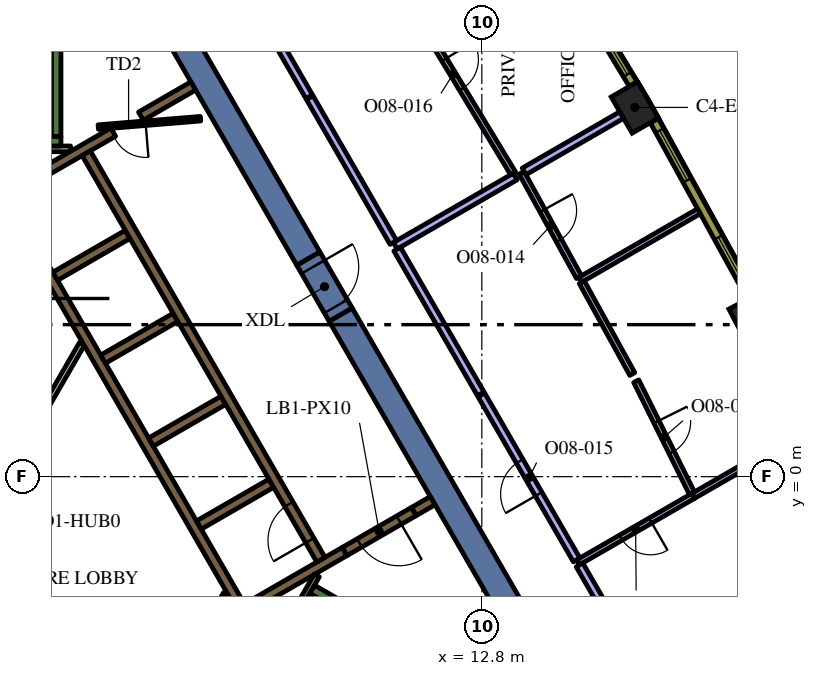
"""IFC4 building model, lengths in metres.
Left out: names, types, materials, properties, quantities, classifications, styles, units other than length and angle.
Written with IfcOpenShell. Run it as: python <this file> out.ifc"""

import sys

from ifc_helpers import new_model, si_unit, direction, frame, frame_2d, origin, origin_2d, place, context, subcontext, project, spatial, rectangle, extrude, element, fill, save


model = new_model("IFC4")
c1 = context("Model", 3, precision=1e-05, world=origin(), true_north=direction((0.0, 1.0)))
c2 = subcontext(c1, "Body", "Model", "MODEL_VIEW")
j1 = project(units=[si_unit("LENGTHUNIT", "METRE"), si_unit("PLANEANGLEUNIT", "RADIAN")], contexts=[c1])
p1 = place(None, origin())
s1 = spatial("IfcSite", under=j1, at=p1, CompositionType="ELEMENT")
p2 = place(p1, origin())
s2 = spatial("IfcBuilding", under=s1, at=p2, CompositionType="ELEMENT")
p3 = place(p2, frame((0.0, 0.0, 235.2)))
s3 = spatial("IfcBuildingStorey", under=s2, at=p3, CompositionType="ELEMENT", Elevation=235.2)
for number, where, z_axis, x_axis in (
    (1, (19.912, 4.108, 0.0), (0.0, 0.0, 1.0), (-0.464, 0.886, 0.0)),
    (2, (16.827, 9.715, 0.0), (0.0, 0.0, 1.0), (-0.5, 0.866, 0.0)),
):
    element("IfcColumn", number, at=place(p3, frame(where, z_axis=z_axis, x_axis=x_axis)), inside=s3, PredefinedType="COLUMN", context=c2, shape_type="SweptSolid", body=[
        extrude(rectangle(XDim=1.1, YDim=0.8, at=origin_2d()), origin(), (0.0, 0.0, 1.0), 4.2),
    ])
for number, where, z_axis, x_axis in (
    (3, (9.085, 4.264, 0.0), (0.0, 0.0, 1.0), (0.5, -0.866, 0.0)),
    (4, (8.235, 5.736, 0.0), (0.0, 0.0, 1.0), (-0.5, 0.866, 0.0)),
):
    element("IfcWall", number, at=place(p3, frame(where, z_axis=z_axis, x_axis=x_axis)), inside=s3, PredefinedType="SOLIDWALL", context=c2, shape_type="SweptSolid", body=[
        extrude(rectangle(XDim=12.472, YDim=0.7, at=frame_2d((6.236, 0.0))), origin(), (0.0, 0.0, 1.0), 4.2),
    ])
p4 = place(p3, frame((8.334, -2.964, 0.0), z_axis=(0.0, 0.0, 1.0), x_axis=(0.866016039709, -0.500016218704, 0.0)))
e5 = element("IfcWall", 5, at=p4, inside=s3, PredefinedType="SOLIDWALL", context=c2, shape_type="SweptSolid", body=[
    extrude(rectangle(XDim=7.05, YDim=0.25, at=frame_2d((3.525, 0.0))), origin(), (0.0, 0.0, 1.0), 4.2),
])
p5 = place(p3, frame((8.168, -3.503, 0.0), z_axis=(0.0, 0.0, 1.0), x_axis=(0.49972245349, 0.866185586049, 0.0)))
e6 = element("IfcWall", 6, at=p5, inside=s3, PredefinedType="SOLIDWALL", context=c2, shape_type="SweptSolid", body=[
    extrude(rectangle(XDim=0.425, YDim=0.25, at=frame_2d((0.212, 0.0))), origin(), (0.0, 0.0, 1.0), 4.2),
])
p6 = place(p3, frame((1.6, 8.95, 0.0), z_axis=(0.0, 0.0, 1.0), x_axis=(0.0, 1.0, 0.0)))
e7 = element("IfcWall", 7, at=p6, inside=s3, PredefinedType="SOLIDWALL", context=c2, shape_type="SweptSolid", body=[
    extrude(rectangle(XDim=6.8, YDim=0.25, at=frame_2d((3.4, 0.0))), origin(), (0.0, 0.0, 1.0), 4.2),
])
p7 = place(p3, frame((1.05, 8.825, 0.0), z_axis=(0.0, 0.0, 1.0), x_axis=(1.0, 0.0, 0.0)))
e8 = element("IfcWall", 8, at=p7, inside=s3, PredefinedType="SOLIDWALL", context=c2, shape_type="SweptSolid", body=[
    extrude(rectangle(XDim=0.675, YDim=0.25, at=frame_2d((0.337, 0.0))), origin(), (0.0, 0.0, 1.0), 4.2),
])
p8 = place(p3, frame((11.507, -0.631, 0.0), z_axis=(0.0, 0.0, 1.0), x_axis=(-0.866093731455, -0.499881634324, 0.0)))
e9 = element("IfcWall", 9, at=p8, inside=s3, PredefinedType="SOLIDWALL", context=c2, shape_type="SweptSolid", body=[
    extrude(rectangle(XDim=0.575, YDim=0.25, at=frame_2d((0.288, 0.0))), origin(), (0.0, 0.0, 1.0), 4.2),
])
p9 = place(p3, frame((6.568, -3.627, 0.0), z_axis=(0.0, 0.0, 1.0), x_axis=(-0.499999455981, 0.866025717874, 0.0)))
e10 = element("IfcWall", 10, at=p9, inside=s3, PredefinedType="SOLIDWALL", context=c2, shape_type="SweptSolid", body=[
    extrude(rectangle(XDim=11.978, YDim=0.25, at=frame_2d((5.989, 0.0))), origin(), (0.0, 0.0, 1.0), 4.2),
])
p10 = place(p3, frame((3.1, 9.064, 0.0), z_axis=(0.0, 0.0, 1.0), x_axis=(-0.866030133475, -0.499991807846, 0.0)))
e11 = element("IfcWall", 11, at=p10, inside=s3, PredefinedType="SOLIDWALL", context=c2, shape_type="SweptSolid", body=[
    extrude(rectangle(XDim=3.217, YDim=0.25, at=frame_2d((1.608, 0.0))), origin(), (0.0, 0.0, 1.0), 4.2),
])
p11 = place(p3, frame((1.574, 5.274, 0.0), z_axis=(0.0, 0.0, 1.0), x_axis=(0.866028486751, 0.499994660107, 0.0)))
e12 = element("IfcWall", 12, at=p11, inside=s3, PredefinedType="SOLIDWALL", context=c2, shape_type="SweptSolid", body=[
    extrude(rectangle(XDim=2.2, YDim=0.25, at=frame_2d((1.1, 0.0))), origin(), (0.0, 0.0, 1.0), 4.2),
])
for number, where, z_axis, x_axis in (
    (13, (2.834, 3.091, 0.0), (0.0, 0.0, 1.0), (0.866, 0.5, 0.0)),
    (14, (4.094, 0.909, 0.0), (0.0, 0.0, 1.0), (0.866, 0.5, 0.0)),
    (15, (5.354, -1.274, 0.0), (0.0, 0.0, 1.0), (0.866, 0.5, 0.0)),
):
    element("IfcWall", number, at=place(p3, frame(where, z_axis=z_axis, x_axis=x_axis)), inside=s3, PredefinedType="SOLIDWALL", context=c2, shape_type="SweptSolid", body=[
        extrude(rectangle(XDim=2.2, YDim=0.25, at=frame_2d((1.1, 0.0))), origin(), (0.0, 0.0, 1.0), 4.2),
    ])
p12 = place(p3, frame((6.614, -3.456, 0.0), z_axis=(0.0, 0.0, 1.0), x_axis=(0.866032512851, 0.499987686533, 0.0)))
e16 = element("IfcWall", 16, at=p12, inside=s3, PredefinedType="SOLIDWALL", context=c2, shape_type="SweptSolid", body=[
    extrude(rectangle(XDim=2.975, YDim=0.25, at=frame_2d((1.487, 0.0))), origin(), (0.0, 0.0, 1.0), 4.2),
])
p13 = place(p3, frame((3.83, 9.486, 0.0), z_axis=(0.0, 0.0, 1.0), x_axis=(0.865986202621, 0.500067892261, 0.0)))
e17 = element("IfcWall", 17, at=p13, inside=s3, PredefinedType="SOLIDWALL", context=c2, shape_type="SweptSolid", body=[
    extrude(rectangle(XDim=1.591, YDim=0.25, at=frame_2d((0.795, 0.0))), origin(), (0.0, 0.0, 1.0), 4.2),
])
p14 = place(p3, frame((1.05, 8.625, 0.0), z_axis=(0.0, 0.0, 1.0), x_axis=(1.0, 0.0, 0.0)))
e18 = element("IfcWall", 18, at=p14, inside=s3, PredefinedType="PARTITIONING", context=c2, shape_type="SweptSolid", body=[
    extrude(rectangle(XDim=0.929, YDim=0.15, at=frame_2d((0.464, 0.0))), origin(), (0.0, 0.0, 1.0), 3.45),
])
p15 = place(p3, frame((8.459, -2.599, 0.0), z_axis=(0.0, 0.0, 1.0), x_axis=(-0.500041054325, -0.866001699761, 0.0)))
e19 = element("IfcWall", 19, at=p15, inside=s3, PredefinedType="PARTITIONING", context=c2, shape_type="SweptSolid", body=[
    extrude(rectangle(XDim=0.929, YDim=0.15, at=frame_2d((0.464, 0.0))), origin(), (0.0, 0.0, 1.0), 4.2),
])
p16 = place(p3, frame((5.705, -3.718, 0.0), z_axis=(0.0, 0.0, 1.0), x_axis=(0.499962090823, 0.866047289552, 0.0)))
e20 = element("IfcWall", 20, at=p16, inside=s3, PredefinedType="PARTITIONING", context=c2, shape_type="SweptSolid", body=[
    extrude(rectangle(XDim=0.735, YDim=0.15, at=frame_2d((0.367, 0.0))), origin(), (0.0, 0.0, 1.0), 3.45),
])
p17 = place(p3, frame((0.72, 0.797, 0.0), z_axis=(0.0, 0.0, 1.0), x_axis=(0.499984921984, 0.866034108906, 0.0)))
e21 = element("IfcWall", 21, at=p17, inside=s3, PredefinedType="PARTITIONING", context=c2, shape_type="SweptSolid", body=[
    extrude(rectangle(XDim=3.113, YDim=0.15, at=frame_2d((1.557, 0.0))), origin(), (0.0, 0.0, 1.0), 3.45),
])
p18 = place(p3, frame((8.565, -2.185, 0.0), z_axis=(0.0, 0.0, 1.0), x_axis=(-0.499997954832, 0.866026584559, 0.0)))
e22 = element("IfcWall", 22, at=p18, inside=s3, PredefinedType="SOLIDWALL", context=c2, shape_type="SweptSolid", body=[
    extrude(rectangle(XDim=12.35, YDim=0.25, at=frame_2d((6.175, 0.0))), origin(), (0.0, 0.0, 1.0), 4.2),
])
p19 = place(p18, frame((0.585, 0.0, 0.0)))
e23 = element("IfcOpeningElement", 23, at=p19, cuts=e22, PredefinedType="OPENING", context=c2, shape_type="SweptSolid", body=[
    extrude(rectangle(XDim=1.1, YDim=2.1, at=frame_2d((0.55, 1.05))), frame((0.0, 0.135, 0.0), z_axis=(0.0, -1.0, 0.0), x_axis=(1.0, 0.0, 0.0)), (0.0, 0.0, 1.0), 0.27),
])
p20 = place(p3, frame((5.398, 9.419, 0.0), z_axis=(0.0, 0.0, 1.0), x_axis=(-0.996653416376, -0.081743303248, 0.0)))
e24 = element("IfcWall", 24, at=p20, inside=s3, PredefinedType="PARTITIONING", context=c2, shape_type="SweptSolid", body=[
    extrude(rectangle(XDim=2.7, YDim=0.12, at=frame_2d((1.35, 0.0))), origin(), (0.0, 0.0, 1.0), 3.45),
])
p21 = place(p20, frame((1.45, 0.0, 0.0)))
e25 = element("IfcOpeningElement", 25, at=p21, cuts=e24, PredefinedType="OPENING", context=c2, shape_type="SweptSolid", body=[
    extrude(rectangle(XDim=0.9, YDim=2.1, at=frame_2d((0.45, 1.05))), frame((0.0, 0.07, 0.0), z_axis=(0.0, -1.0, 0.0), x_axis=(1.0, 0.0, 0.0)), (0.0, 0.0, 1.0), 0.14),
])
p22 = place(p3, frame((11.009, -0.919, 0.0), z_axis=(0.0, 0.0, 1.0), x_axis=(-0.866059744384, -0.49994051562, 0.0)))
e26 = element("IfcWall", 26, at=p22, inside=s3, PredefinedType="SOLIDWALL", context=c2, shape_type="SweptSolid", body=[
    extrude(rectangle(XDim=2.1, YDim=0.25, at=frame_2d((1.05, 0.0))), origin(), (0.0, 0.0, 1.0), 4.2),
])
p23 = place(p22, frame((0.45, 0.0, 0.0)))
e27 = element("IfcOpeningElement", 27, at=p23, cuts=e26, PredefinedType="OPENING", context=c2, shape_type="SweptSolid", body=[
    extrude(rectangle(XDim=1.2, YDim=2.1, at=frame_2d((0.6, 1.05))), frame((0.0, 0.135, 0.0), z_axis=(0.0, -1.0, 0.0), x_axis=(1.0, 0.0, 0.0)), (0.0, 0.0, 1.0), 0.27),
])
p24 = place(p3, frame((8.235, 5.736, 0.0), z_axis=(0.0, 0.0, 1.0), x_axis=(0.499954529098, -0.86605165483, 0.0)))
e28 = element("IfcWall", 28, at=p24, inside=s3, PredefinedType="SOLIDWALL", context=c2, shape_type="SweptSolid", body=[
    extrude(rectangle(XDim=1.7, YDim=0.7, at=frame_2d((0.85, 0.0))), origin(), (0.0, 0.0, 1.0), 4.2),
])
p25 = place(p24, frame((0.25, 0.0, 0.0)))
e29 = element("IfcOpeningElement", 29, at=p25, cuts=e28, PredefinedType="OPENING", context=c2, shape_type="SweptSolid", body=[
    extrude(rectangle(XDim=1.2, YDim=2.1, at=frame_2d((0.6, 1.05))), frame((0.0, 0.36, 0.0), z_axis=(0.0, -1.0, 0.0), x_axis=(1.0, 0.0, 0.0)), (0.0, 0.0, 1.0), 0.72),
])
p26 = place(p3, frame((18.36, -0.508, 0.0), z_axis=(0.0, 0.0, 1.0), x_axis=(0.866033589339, 0.499985821935, 0.0)))
e30 = element("IfcWall", 30, at=p26, inside=s3, PredefinedType="PARTITIONING", context=c2, shape_type="SweptSolid", body=[
    extrude(rectangle(XDim=3.611, YDim=0.15, at=frame_2d((1.805, 0.0))), origin(), (0.0, 0.0, 1.0), 3.45),
])
p27 = place(p3, frame((18.367, -0.504, 0.0), z_axis=(0.0, 0.0, 1.0), x_axis=(-0.866056812483, -0.499945594592, 0.0)))
e31 = element("IfcWall", 31, at=p27, inside=s3, PredefinedType="PARTITIONING", context=c2, shape_type="SweptSolid", body=[
    extrude(rectangle(XDim=3.504, YDim=0.15, at=frame_2d((1.752, 0.0))), origin(), (0.0, 0.0, 1.0), 3.45),
])
p28 = place(p27, frame((1.304, 0.0, 0.0)))
e32 = element("IfcOpeningElement", 32, at=p28, cuts=e31, PredefinedType="OPENING", context=c2, shape_type="SweptSolid", body=[
    extrude(rectangle(XDim=0.9, YDim=2.1, at=frame_2d((0.45, 1.05))), frame((0.0, 0.085, 0.0), z_axis=(0.0, -1.0, 0.0), x_axis=(1.0, 0.0, 0.0)), (0.0, 0.0, 1.0), 0.17),
])
p29 = place(p3, frame((17.696, -6.35, 0.0), z_axis=(0.0, 0.0, 1.0), x_axis=(-0.499976825411, 0.866038783226, 0.0)))
e33 = element("IfcWall", 33, at=p29, inside=s3, PredefinedType="PARTITIONING", context=c2, shape_type="SweptSolid", body=[
    extrude(rectangle(XDim=4.653, YDim=0.2, at=frame_2d((2.326, 0.0))), origin(), (0.0, 0.0, 1.0), 3.45),
])
p30 = place(p3, frame((15.394, 5.183, 0.0), z_axis=(0.0, 0.0, 1.0), x_axis=(0.866039935929, 0.499974828743, 0.0)))
e34 = element("IfcWall", 34, at=p30, inside=s3, PredefinedType="PARTITIONING", context=c2, shape_type="SweptSolid", body=[
    extrude(rectangle(XDim=3.601, YDim=0.15, at=frame_2d((1.8, 0.0))), origin(), (0.0, 0.0, 1.0), 3.45),
])
p31 = place(p3, frame((16.863, 2.513, 0.0), z_axis=(0.0, 0.0, 1.0), x_axis=(0.445197589821, -0.895432357031, 0.0)))
e35 = element("IfcWall", 35, at=p31, inside=s3, PredefinedType="PARTITIONING", context=c2, shape_type="SweptSolid", body=[
    extrude(rectangle(XDim=3.296, YDim=0.15, at=frame_2d((1.648, 0.0))), origin(), (0.0, 0.0, 1.0), 3.45),
])
p32 = place(p31, frame((1.196, 0.0, 0.0)))
e36 = element("IfcOpeningElement", 36, at=p32, cuts=e35, PredefinedType="OPENING", context=c2, shape_type="SweptSolid", body=[
    extrude(rectangle(XDim=0.9, YDim=2.1, at=frame_2d((0.45, 1.05))), frame((0.0, 0.085, 0.0), z_axis=(0.0, -1.0, 0.0), x_axis=(1.0, 0.0, 0.0)), (0.0, 0.0, 1.0), 0.17),
])
p33 = place(p3, frame((16.76, 2.7, 0.0), z_axis=(0.0, 0.0, 1.0), x_axis=(-0.481888167687, 0.876232728128, 0.0)))
e37 = element("IfcWall", 37, at=p33, inside=s3, PredefinedType="PARTITIONING", context=c2, shape_type="SweptSolid", body=[
    extrude(rectangle(XDim=2.758, YDim=0.15, at=frame_2d((1.379, 0.0))), origin(), (0.0, 0.0, 1.0), 3.45),
])
p34 = place(p3, frame((13.848, 7.995, 0.0), z_axis=(0.0, 0.0, 1.0), x_axis=(0.481894826099, -0.876229066272, 0.0)))
e38 = element("IfcWall", 38, at=p34, inside=s3, PredefinedType="PARTITIONING", context=c2, shape_type="SweptSolid", body=[
    extrude(rectangle(XDim=3.134, YDim=0.15, at=frame_2d((1.567, 0.0))), origin(), (0.0, 0.0, 1.0), 3.45),
])
p35 = place(p34, frame((1.134, 0.0, 0.0)))
e39 = element("IfcOpeningElement", 39, at=p35, cuts=e38, PredefinedType="OPENING", context=c2, shape_type="SweptSolid", body=[
    extrude(rectangle(XDim=0.9, YDim=2.1, at=frame_2d((0.45, 1.05))), frame((0.0, 0.085, 0.0), z_axis=(0.0, -1.0, 0.0), x_axis=(1.0, 0.0, 0.0)), (0.0, 0.0, 1.0), 0.17),
])
p36 = place(p3, frame((13.913, 8.032, 0.0), z_axis=(0.0, 0.0, 1.0), x_axis=(0.866015594979, 0.500016988964, 0.0)))
e40 = element("IfcWall", 40, at=p36, inside=s3, PredefinedType="PARTITIONING", context=c2, shape_type="SweptSolid", body=[
    extrude(rectangle(XDim=2.966, YDim=0.2, at=frame_2d((1.483, 0.0))), origin(), (0.0, 0.0, 1.0), 3.45),
])
p37 = place(p3, frame((10.522, 6.075, 0.0), z_axis=(0.0, 0.0, 1.0), x_axis=(0.866003708037, 0.500037576254, 0.0)))
e41 = element("IfcWall", 41, at=p37, inside=s3, PredefinedType="PARTITIONING", context=c2, shape_type="SweptSolid", body=[
    extrude(rectangle(XDim=3.644, YDim=0.2, at=frame_2d((1.822, 0.0))), origin(), (0.0, 0.0, 1.0), 3.45),
])
p38 = place(p3, frame((12.772, 2.178, 0.0), z_axis=(0.0, 0.0, 1.0), x_axis=(-0.50001224981, 0.866018331238, 0.0)))
e42 = element("IfcWall", 42, at=p38, inside=s3, PredefinedType="PARTITIONING", context=c2, shape_type="SweptSolid", body=[
    extrude(rectangle(XDim=4.4, YDim=0.2, at=frame_2d((2.2, 0.0))), origin(), (0.0, 0.0, 1.0), 3.45),
])
p39 = place(p3, frame((15.295, -2.191, 0.0), z_axis=(0.0, 0.0, 1.0), x_axis=(-0.500039923732, 0.86600235258, 0.0)))
e43 = element("IfcWall", 43, at=p39, inside=s3, PredefinedType="PARTITIONING", context=c2, shape_type="SweptSolid", body=[
    extrude(rectangle(XDim=5.015, YDim=0.2, at=frame_2d((2.507, 0.0))), origin(), (0.0, 0.0, 1.0), 3.45),
])
p40 = place(p39, frame((2.0, 0.0, 0.0)))
e44 = element("IfcOpeningElement", 44, at=p40, cuts=e43, PredefinedType="OPENING", context=c2, shape_type="SweptSolid", body=[
    extrude(rectangle(XDim=1.0, YDim=2.1, at=frame_2d((0.5, 1.05))), frame((0.0, 0.11, 0.0), z_axis=(0.0, -1.0, 0.0), x_axis=(1.0, 0.0, 0.0)), (0.0, 0.0, 1.0), 0.22),
])
p41 = place(p3, frame((10.439, 13.24, 0.0), z_axis=(0.0, 0.0, 1.0), x_axis=(0.517837859082, -0.855478785068, 0.0)))
e45 = element("IfcWall", 45, at=p41, inside=s3, PredefinedType="PARTITIONING", context=c2, shape_type="SweptSolid", body=[
    extrude(rectangle(XDim=6.148, YDim=0.15, at=frame_2d((3.074, 0.0))), origin(), (0.0, 0.0, 1.0), 3.45),
])
p42 = place(p41, frame((2.648, 0.0, 0.0)))
e46 = element("IfcOpeningElement", 46, at=p42, cuts=e45, PredefinedType="OPENING", context=c2, shape_type="SweptSolid", body=[
    extrude(rectangle(XDim=0.9, YDim=2.1, at=frame_2d((0.45, 1.05))), frame((0.0, 0.085, 0.0), z_axis=(0.0, -1.0, 0.0), x_axis=(1.0, 0.0, 0.0)), (0.0, 0.0, 1.0), 0.17),
])
p43 = place(p3, frame((10.472, 6.162, 0.0), z_axis=(0.0, 0.0, 1.0), x_axis=(-0.499988222896, 0.866032203192, 0.0)))
e47 = element("IfcWall", 47, at=p43, inside=s3, PredefinedType="PARTITIONING", context=c2, shape_type="SweptSolid", body=[
    extrude(rectangle(XDim=4.4, YDim=0.2, at=frame_2d((2.2, 0.0))), origin(), (0.0, 0.0, 1.0), 3.45),
])
p44 = place(p3, frame((8.257, 9.998, 0.0), z_axis=(0.0, 0.0, 1.0), x_axis=(-0.499987955211, 0.866032357735, 0.0)))
e48 = element("IfcWall", 48, at=p44, inside=s3, PredefinedType="PARTITIONING", context=c2, shape_type="SweptSolid", body=[
    extrude(rectangle(XDim=9.817, YDim=0.2, at=frame_2d((4.909, 0.0))), origin(), (0.0, 0.0, 1.0), 3.45),
])
p45 = place(p44, frame((4.4, 0.0, 0.0)))
e49 = element("IfcOpeningElement", 49, at=p45, cuts=e48, PredefinedType="OPENING", context=c2, shape_type="SweptSolid", body=[
    extrude(rectangle(XDim=1.0, YDim=2.1, at=frame_2d((0.5, 1.05))), frame((0.0, 0.11, 0.0), z_axis=(0.0, -1.0, 0.0), x_axis=(1.0, 0.0, 0.0)), (0.0, 0.0, 1.0), 0.22),
])
p46 = place(p3, frame((19.892, 4.725, 0.0), z_axis=(0.0, 0.0, 1.0), x_axis=(-0.481925825015, 0.876212017256, 0.0)))
e50 = element("IfcWall", 50, at=p46, inside=s3, PredefinedType="SOLIDWALL", context=c2, shape_type="SweptSolid", body=[
    extrude(rectangle(XDim=5.299, YDim=0.24, at=frame_2d((2.649, 0.0))), origin(), (0.0, 0.0, 1.0), 3.95),
])
p47 = place(p46, frame((0.295, 0.0, 0.9)))
e51 = element("IfcOpeningElement", 51, at=p47, cuts=e50, PredefinedType="OPENING", context=c2, shape_type="SweptSolid", body=[
    extrude(rectangle(XDim=1.5, YDim=2.55, at=frame_2d((0.75, 1.275))), frame((0.0, 0.13, 0.0), z_axis=(0.0, -1.0, 0.0), x_axis=(1.0, 0.0, 0.0)), (0.0, 0.0, 1.0), 0.26),
])
p48 = place(p46, frame((3.504, 0.0, 0.9)))
e52 = element("IfcOpeningElement", 52, at=p48, cuts=e50, PredefinedType="OPENING", context=c2, shape_type="SweptSolid", body=[
    extrude(rectangle(XDim=1.5, YDim=2.55, at=frame_2d((0.75, 1.275))), frame((0.0, 0.13, 0.0), z_axis=(0.0, -1.0, 0.0), x_axis=(1.0, 0.0, 0.0)), (0.0, 0.0, 1.0), 0.26),
])
p49 = place(p3, frame((16.782, 10.331, 0.0), z_axis=(0.0, 0.0, 1.0), x_axis=(-0.517846166225, 0.855473756538, 0.0)))
e53 = element("IfcWall", 53, at=p49, inside=s3, PredefinedType="SOLIDWALL", context=c2, shape_type="SweptSolid", body=[
    extrude(rectangle(XDim=5.298, YDim=0.24, at=frame_2d((2.649, 0.0))), origin(), (0.0, 0.0, 1.0), 3.95),
])
p50 = place(p49, frame((0.294, 0.0, 0.9)))
e54 = element("IfcOpeningElement", 54, at=p50, cuts=e53, PredefinedType="OPENING", context=c2, shape_type="SweptSolid", body=[
    extrude(rectangle(XDim=1.5, YDim=2.55, at=frame_2d((0.75, 1.275))), frame((0.0, 0.13, 0.0), z_axis=(0.0, -1.0, 0.0), x_axis=(1.0, 0.0, 0.0)), (0.0, 0.0, 1.0), 0.26),
])
p51 = place(p49, frame((3.504, 0.0, 0.9)))
e55 = element("IfcOpeningElement", 55, at=p51, cuts=e53, PredefinedType="OPENING", context=c2, shape_type="SweptSolid", body=[
    extrude(rectangle(XDim=1.5, YDim=2.55, at=frame_2d((0.75, 1.275))), frame((0.0, 0.13, 0.0), z_axis=(0.0, -1.0, 0.0), x_axis=(1.0, 0.0, 0.0)), (0.0, 0.0, 1.0), 0.26),
])
p52 = place(p19, origin())
e56 = element("IfcDoor", 56, at=p52, inside=s3, OperationType="DOUBLE_DOOR_SLIDING", PredefinedType="DOOR", context=c2, shape_type="SweptSolid", body=[
    extrude(rectangle(XDim=1.1, YDim=2.1, at=frame_2d((0.55, 1.05))), frame((0.0, 0.025, 0.0), z_axis=(0.0, -1.0, 0.0), x_axis=(1.0, 0.0, 0.0)), (0.0, 0.0, 1.0), 0.05),
])
fill(e23, e56)
p53 = place(p21, origin())
e57 = element("IfcDoor", 57, at=p53, inside=s3, OperationType="SINGLE_SWING_LEFT", PredefinedType="DOOR", context=c2, shape_type="SweptSolid", body=[
    extrude(rectangle(XDim=0.9, YDim=2.1, at=frame_2d((0.45, 1.05))), frame((0.0, 0.025, 0.0), z_axis=(0.0, -1.0, 0.0), x_axis=(1.0, 0.0, 0.0)), (0.0, 0.0, 1.0), 0.05),
])
fill(e25, e57)
p54 = place(p23, origin())
e58 = element("IfcDoor", 58, at=p54, inside=s3, OperationType="SINGLE_SWING_LEFT", PredefinedType="DOOR", context=c2, shape_type="SweptSolid", body=[
    extrude(rectangle(XDim=1.2, YDim=2.1, at=frame_2d((0.6, 1.05))), frame((0.0, 0.025, 0.0), z_axis=(0.0, -1.0, 0.0), x_axis=(1.0, 0.0, 0.0)), (0.0, 0.0, 1.0), 0.05),
])
fill(e27, e58)
p55 = place(p25, origin())
e59 = element("IfcDoor", 59, at=p55, inside=s3, OperationType="SINGLE_SWING_LEFT", PredefinedType="DOOR", context=c2, shape_type="SweptSolid", body=[
    extrude(rectangle(XDim=1.2, YDim=2.1, at=frame_2d((0.6, 1.05))), frame((0.0, 0.025, 0.0), z_axis=(0.0, -1.0, 0.0), x_axis=(1.0, 0.0, 0.0)), (0.0, 0.0, 1.0), 0.05),
])
fill(e29, e59)
p56 = place(p28, origin())
e60 = element("IfcDoor", 60, at=p56, inside=s3, OperationType="SINGLE_SWING_RIGHT", PredefinedType="DOOR", context=c2, shape_type="SweptSolid", body=[
    extrude(rectangle(XDim=0.9, YDim=2.1, at=frame_2d((0.45, 1.05))), frame((0.0, 0.025, 0.0), z_axis=(0.0, -1.0, 0.0), x_axis=(1.0, 0.0, 0.0)), (0.0, 0.0, 1.0), 0.05),
])
fill(e32, e60)
p57 = place(p32, origin())
e61 = element("IfcDoor", 61, at=p57, inside=s3, OperationType="SINGLE_SWING_LEFT", PredefinedType="DOOR", context=c2, shape_type="SweptSolid", body=[
    extrude(rectangle(XDim=0.9, YDim=2.1, at=frame_2d((0.45, 1.05))), frame((0.0, 0.025, 0.0), z_axis=(0.0, -1.0, 0.0), x_axis=(1.0, 0.0, 0.0)), (0.0, 0.0, 1.0), 0.05),
])
fill(e36, e61)
p58 = place(p35, origin())
e62 = element("IfcDoor", 62, at=p58, inside=s3, OperationType="SINGLE_SWING_RIGHT", PredefinedType="DOOR", context=c2, shape_type="SweptSolid", body=[
    extrude(rectangle(XDim=0.9, YDim=2.1, at=frame_2d((0.45, 1.05))), frame((0.0, 0.025, 0.0), z_axis=(0.0, -1.0, 0.0), x_axis=(1.0, 0.0, 0.0)), (0.0, 0.0, 1.0), 0.05),
])
fill(e39, e62)
p59 = place(p40, origin())
e63 = element("IfcDoor", 63, at=p59, inside=s3, OperationType="SINGLE_SWING_LEFT", PredefinedType="DOOR", context=c2, shape_type="SweptSolid", body=[
    extrude(rectangle(XDim=1.0, YDim=2.1, at=frame_2d((0.5, 1.05))), frame((0.0, 0.025, 0.0), z_axis=(0.0, -1.0, 0.0), x_axis=(1.0, 0.0, 0.0)), (0.0, 0.0, 1.0), 0.05),
])
fill(e44, e63)
p60 = place(p42, origin())
e64 = element("IfcDoor", 64, at=p60, inside=s3, OperationType="SINGLE_SWING_RIGHT", PredefinedType="DOOR", context=c2, shape_type="SweptSolid", body=[
    extrude(rectangle(XDim=0.9, YDim=2.1, at=frame_2d((0.45, 1.05))), frame((0.0, 0.025, 0.0), z_axis=(0.0, -1.0, 0.0), x_axis=(1.0, 0.0, 0.0)), (0.0, 0.0, 1.0), 0.05),
])
fill(e46, e64)
p61 = place(p47, origin())
e65 = element("IfcWindow", 65, at=p61, inside=s3, PartitioningType="SINGLE_PANEL", PredefinedType="WINDOW", context=c2, shape_type="SweptSolid", body=[
    extrude(rectangle(XDim=1.5, YDim=2.55, at=frame_2d((0.75, 1.275))), frame((0.0, 0.04, 0.0), z_axis=(0.0, -1.0, 0.0), x_axis=(1.0, 0.0, 0.0)), (0.0, 0.0, 1.0), 0.06),
])
fill(e51, e65)
p62 = place(p48, origin())
e66 = element("IfcWindow", 66, at=p62, inside=s3, PartitioningType="SINGLE_PANEL", PredefinedType="WINDOW", context=c2, shape_type="SweptSolid", body=[
    extrude(rectangle(XDim=1.5, YDim=2.55, at=frame_2d((0.75, 1.275))), frame((0.0, 0.04, 0.0), z_axis=(0.0, -1.0, 0.0), x_axis=(1.0, 0.0, 0.0)), (0.0, 0.0, 1.0), 0.06),
])
fill(e52, e66)
p63 = place(p50, origin())
e67 = element("IfcWindow", 67, at=p63, inside=s3, PartitioningType="SINGLE_PANEL", PredefinedType="WINDOW", context=c2, shape_type="SweptSolid", body=[
    extrude(rectangle(XDim=1.5, YDim=2.55, at=frame_2d((0.75, 1.275))), frame((0.0, 0.04, 0.0), z_axis=(0.0, -1.0, 0.0), x_axis=(1.0, 0.0, 0.0)), (0.0, 0.0, 1.0), 0.06),
])
fill(e54, e67)
save(model, sys.argv[1])
